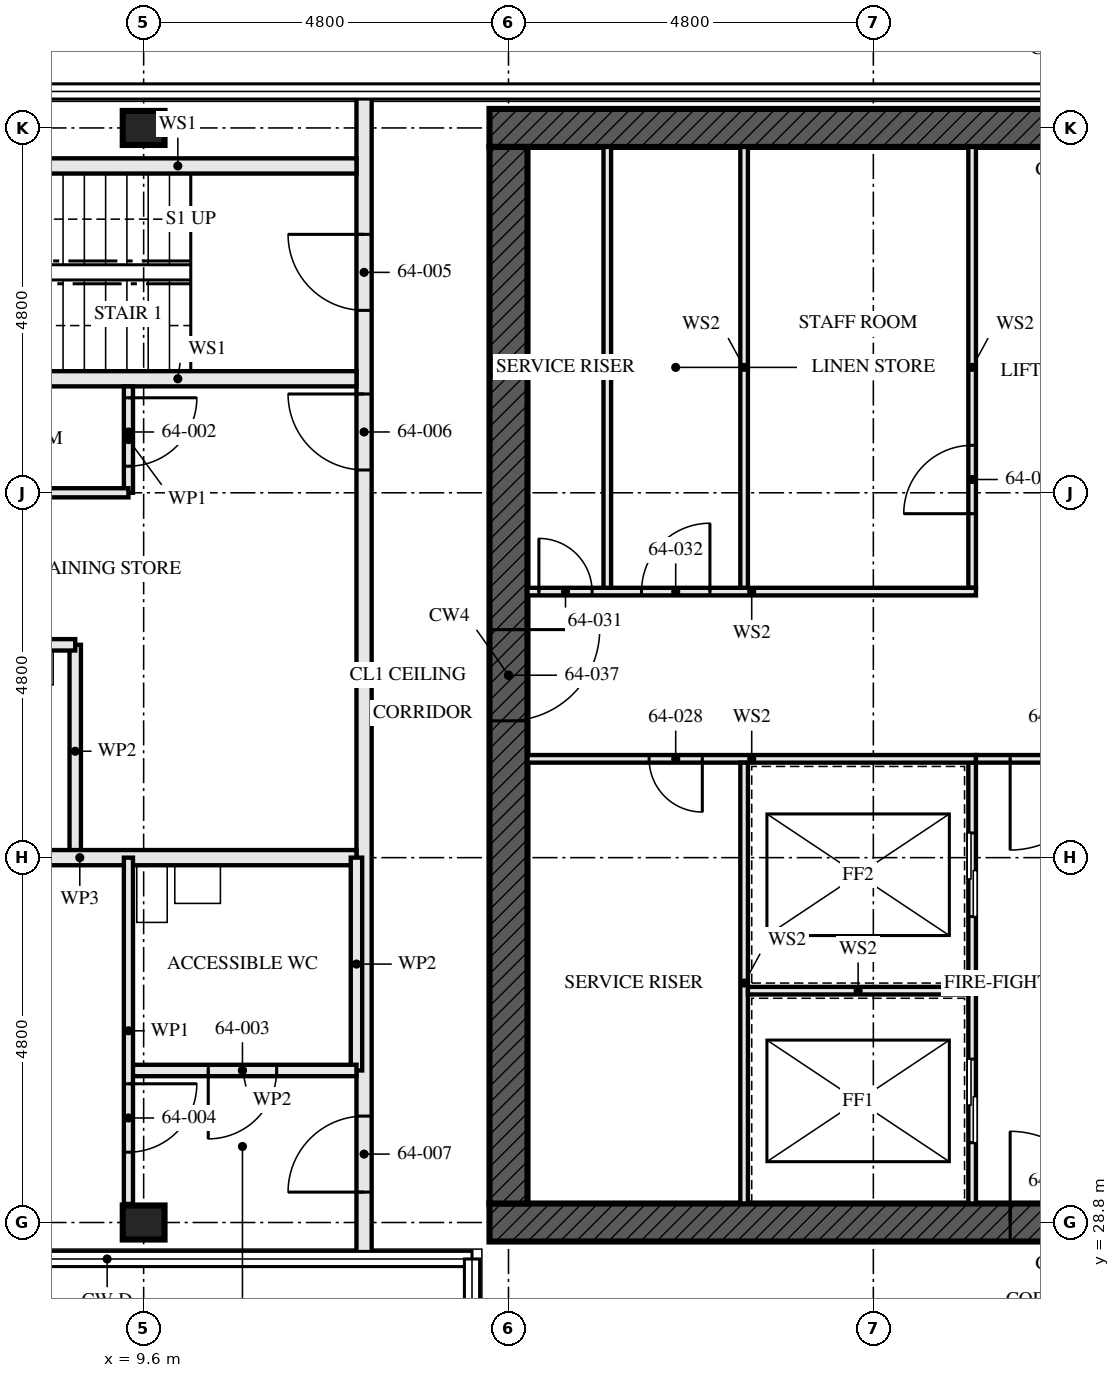
"""IFC4 building model, lengths in metres.
Left out: names, types, materials, properties, quantities, classifications, styles, units other than length and angle.
Written with IfcOpenShell. Run it as: python <this file> out.ifc"""

import sys

from ifc_helpers import new_model, si_unit, direction, frame, frame_2d, origin, origin_2d, place, context, subcontext, project, spatial, rectangle, i_section, extrude, element, fill, save


model = new_model("IFC4")
c1 = context("Model", 3, precision=1e-05, world=origin(), true_north=direction((0.0, 1.0)))
c2 = subcontext(c1, "Body", "Model", "MODEL_VIEW")
j1 = project(units=[si_unit("LENGTHUNIT", "METRE"), si_unit("PLANEANGLEUNIT", "RADIAN")], contexts=[c1])
p1 = place(None, origin())
s1 = spatial("IfcSite", under=j1, at=p1, CompositionType="ELEMENT")
p2 = place(p1, origin())
s2 = spatial("IfcBuilding", under=s1, at=p2, CompositionType="ELEMENT")
p3 = place(p2, frame((0.0, 0.0, 233.0)))
s3 = spatial("IfcBuildingStorey", under=s2, at=p3, CompositionType="ELEMENT", Elevation=233.0)
for number, where, z_axis, x_axis in (
    (1, (9.6, 28.8, 0.0), (0.0, 0.0, 1.0), (0.0, 1.0, 0.0)),
    (2, (9.6, 43.2, 0.0), (0.0, 0.0, 1.0), (0.0, 1.0, 0.0)),
):
    element("IfcColumn", number, at=place(p3, frame(where, z_axis=z_axis, x_axis=x_axis)), inside=s3, PredefinedType="COLUMN", context=c2, shape_type="SweptSolid", body=[
        extrude(i_section(OverallWidth=0.448, OverallDepth=0.55, WebThickness=0.072, FlangeThickness=0.115, FilletRadius=0.015, at=origin_2d()), origin(), (0.0, 0.0, 1.0), 3.5),
    ])
p4 = place(p3, frame((14.15, 28.8, -0.17), z_axis=(0.0, 0.0, 1.0), x_axis=(1.0, 0.0, 0.0)))
e3 = element("IfcWall", 3, at=p4, inside=s3, PredefinedType="SHEAR", context=c2, shape_type="SweptSolid", body=[
    extrude(rectangle(XDim=14.9, YDim=0.5, at=frame_2d((7.45, 0.0))), origin(), (0.0, 0.0, 1.0), 3.5),
])
p5 = place(p4, frame((6.85, 0.0, 0.17)))
e4 = element("IfcOpeningElement", 4, at=p5, cuts=e3, PredefinedType="OPENING", context=c2, shape_type="SweptSolid", body=[
    extrude(rectangle(XDim=1.2, YDim=2.1, at=frame_2d((0.6, 1.05))), frame((0.0, 0.26, 0.0), z_axis=(0.0, -1.0, 0.0), x_axis=(1.0, 0.0, 0.0)), (0.0, 0.0, 1.0), 0.521),
])
p6 = place(p3, frame((29.05, 43.2, -0.17), z_axis=(0.0, 0.0, 1.0), x_axis=(-1.0, 0.0, 0.0)))
e5 = element("IfcWall", 5, at=p6, inside=s3, PredefinedType="SHEAR", context=c2, shape_type="SweptSolid", body=[
    extrude(rectangle(XDim=14.9, YDim=0.5, at=frame_2d((7.45, 0.0))), origin(), (0.0, 0.0, 1.0), 3.5),
])
p7 = place(p3, frame((14.4, 42.95, -0.17), z_axis=(0.0, 0.0, 1.0), x_axis=(0.0, -1.0, 0.0)))
e6 = element("IfcWall", 6, at=p7, inside=s3, PredefinedType="SHEAR", context=c2, shape_type="SweptSolid", body=[
    extrude(rectangle(XDim=13.9, YDim=0.5, at=frame_2d((6.95, 0.0))), origin(), (0.0, 0.0, 1.0), 3.5),
])
p8 = place(p7, frame((6.35, 0.0, 0.17)))
e7 = element("IfcOpeningElement", 7, at=p8, cuts=e6, PredefinedType="OPENING", context=c2, shape_type="SweptSolid", body=[
    extrude(rectangle(XDim=1.2, YDim=2.1, at=frame_2d((0.6, 1.05))), frame((0.0, 0.26, 0.0), z_axis=(0.0, -1.0, 0.0), x_axis=(1.0, 0.0, 0.0)), (0.0, 0.0, 1.0), 0.521),
])
for number, where, z_axis, x_axis in (
    (8, (7.7, 42.7, 0.0), (0.0, 0.0, 1.0), (1.0, 0.0, 0.0)),
    (9, (7.7, 39.9, 0.0), (0.0, 0.0, 1.0), (1.0, 0.0, 0.0)),
):
    element("IfcWall", number, at=place(p3, frame(where, z_axis=z_axis, x_axis=x_axis)), inside=s3, PredefinedType="SOLIDWALL", context=c2, shape_type="SweptSolid", body=[
        extrude(rectangle(XDim=4.7, YDim=0.2, at=frame_2d((2.35, 0.0))), origin(), (0.0, 0.0, 1.0), 2.99),
    ])
p9 = place(p3, frame((5.7, 36.4, 0.0), z_axis=(0.0, 0.0, 1.0), x_axis=(1.0, 0.0, 0.0)))
e10 = element("IfcWall", 10, at=p9, inside=s3, PredefinedType="PARTITIONING", context=c2, shape_type="SweptSolid", body=[
    extrude(rectangle(XDim=3.0, YDim=0.15, at=frame_2d((1.5, 0.0))), origin(), (0.0, 0.0, 1.0), 3.33),
])
p10 = place(p9, frame((1.05, 0.0, 0.0)))
e11 = element("IfcOpeningElement", 11, at=p10, cuts=e10, PredefinedType="OPENING", context=c2, shape_type="SweptSolid", body=[
    extrude(rectangle(XDim=0.9, YDim=2.1, at=frame_2d((0.45, 1.05))), frame((0.0, 0.085, 0.0), z_axis=(0.0, -1.0, 0.0), x_axis=(1.0, 0.0, 0.0)), (0.0, 0.0, 1.0), 0.171),
])
p11 = place(p3, frame((8.7, 36.4, 0.0), z_axis=(0.0, 0.0, 1.0), x_axis=(0.0, -1.0, 0.0)))
e12 = element("IfcWall", 12, at=p11, inside=s3, PredefinedType="PARTITIONING", context=c2, shape_type="SweptSolid", body=[
    extrude(rectangle(XDim=2.8, YDim=0.15, at=frame_2d((1.4, 0.0))), origin(), (0.0, 0.0, 1.0), 3.33),
])
p12 = place(p3, frame((9.4, 39.8, 0.0), z_axis=(0.0, 0.0, 1.0), x_axis=(0.0, -1.0, 0.0)))
e13 = element("IfcWall", 13, at=p12, inside=s3, PredefinedType="PARTITIONING", context=c2, shape_type="SweptSolid", body=[
    extrude(rectangle(XDim=1.4, YDim=0.12, at=frame_2d((0.7, 0.0))), origin(), (0.0, 0.0, 1.0), 3.33),
])
p13 = place(p12, frame((0.15, 0.0, 0.0)))
e14 = element("IfcOpeningElement", 14, at=p13, cuts=e13, PredefinedType="OPENING", context=c2, shape_type="SweptSolid", body=[
    extrude(rectangle(XDim=0.9, YDim=2.1, at=frame_2d((0.45, 1.05))), frame((0.0, 0.071, 0.0), z_axis=(0.0, -1.0, 0.0), x_axis=(1.0, 0.0, 0.0)), (0.0, 0.0, 1.0), 0.141),
])
p14 = place(p3, frame((5.7, 38.4, 0.0), z_axis=(0.0, 0.0, 1.0), x_axis=(1.0, 0.0, 0.0)))
e15 = element("IfcWall", 15, at=p14, inside=s3, PredefinedType="PARTITIONING", context=c2, shape_type="SweptSolid", body=[
    extrude(rectangle(XDim=3.7, YDim=0.12, at=frame_2d((1.85, 0.0))), origin(), (0.0, 0.0, 1.0), 2.55),
])
p15 = place(p3, frame((5.12, 33.6, 0.0), z_axis=(0.0, 0.0, 1.0), x_axis=(1.0, 0.0, 0.0)))
e16 = element("IfcWall", 16, at=p15, inside=s3, PredefinedType="PARTITIONING", context=c2, shape_type="SweptSolid", body=[
    extrude(rectangle(XDim=7.28, YDim=0.2, at=frame_2d((3.64, 0.0))), origin(), (0.0, 0.0, 1.0), 2.55),
])
p16 = place(p3, frame((9.4, 30.8, 0.0), z_axis=(0.0, 0.0, 1.0), x_axis=(1.0, 0.0, 0.0)))
e17 = element("IfcWall", 17, at=p16, inside=s3, PredefinedType="PARTITIONING", context=c2, shape_type="SweptSolid", body=[
    extrude(rectangle(XDim=3.0, YDim=0.15, at=frame_2d((1.5, 0.0))), origin(), (0.0, 0.0, 1.0), 3.33),
])
p17 = place(p16, frame((1.05, 0.0, 0.0)))
e18 = element("IfcOpeningElement", 18, at=p17, cuts=e17, PredefinedType="OPENING", context=c2, shape_type="SweptSolid", body=[
    extrude(rectangle(XDim=0.9, YDim=2.1, at=frame_2d((0.45, 1.05))), frame((0.0, 0.085, 0.0), z_axis=(0.0, -1.0, 0.0), x_axis=(1.0, 0.0, 0.0)), (0.0, 0.0, 1.0), 0.171),
])
p18 = place(p3, frame((12.4, 33.6, 0.0), z_axis=(0.0, 0.0, 1.0), x_axis=(0.0, -1.0, 0.0)))
e19 = element("IfcWall", 19, at=p18, inside=s3, PredefinedType="PARTITIONING", context=c2, shape_type="SweptSolid", body=[
    extrude(rectangle(XDim=2.8, YDim=0.15, at=frame_2d((1.4, 0.0))), origin(), (0.0, 0.0, 1.0), 3.33),
])
p19 = place(p3, frame((9.4, 33.6, 0.0), z_axis=(0.0, 0.0, 1.0), x_axis=(0.0, -1.0, 0.0)))
e20 = element("IfcWall", 20, at=p19, inside=s3, PredefinedType="PARTITIONING", context=c2, shape_type="SweptSolid", body=[
    extrude(rectangle(XDim=4.556, YDim=0.12, at=frame_2d((2.278, 0.0))), origin(), (0.0, 0.0, 1.0), 3.33),
])
p20 = place(p19, frame((2.975, 0.0, 0.0)))
e21 = element("IfcOpeningElement", 21, at=p20, cuts=e20, PredefinedType="OPENING", context=c2, shape_type="SweptSolid", body=[
    extrude(rectangle(XDim=0.9, YDim=2.1, at=frame_2d((0.45, 1.05))), frame((0.0, 0.071, 0.0), z_axis=(0.0, -1.0, 0.0), x_axis=(1.0, 0.0, 0.0)), (0.0, 0.0, 1.0), 0.141),
])
p21 = place(p3, frame((12.5, 43.655, 0.0), z_axis=(0.0, 0.0, 1.0), x_axis=(0.0, -1.0, 0.0)))
e22 = element("IfcWall", 22, at=p21, inside=s3, PredefinedType="PARTITIONING", context=c2, shape_type="SweptSolid", body=[
    extrude(rectangle(XDim=15.31, YDim=0.2, at=frame_2d((7.655, 0.0))), origin(), (0.0, 0.0, 1.0), 2.32),
])
p22 = place(p21, frame((1.855, 0.0, 0.0)))
e23 = element("IfcOpeningElement", 23, at=p22, cuts=e22, PredefinedType="OPENING", context=c2, shape_type="SweptSolid", body=[
    extrude(rectangle(XDim=1.0, YDim=2.1, at=frame_2d((0.5, 1.05))), frame((0.0, 0.111, 0.0), z_axis=(0.0, -1.0, 0.0), x_axis=(1.0, 0.0, 0.0)), (0.0, 0.0, 1.0), 0.221),
])
p23 = place(p21, frame((3.955, 0.0, 0.0)))
e24 = element("IfcOpeningElement", 24, at=p23, cuts=e22, PredefinedType="OPENING", context=c2, shape_type="SweptSolid", body=[
    extrude(rectangle(XDim=1.0, YDim=2.1, at=frame_2d((0.5, 1.05))), frame((0.0, 0.111, 0.0), z_axis=(0.0, -1.0, 0.0), x_axis=(1.0, 0.0, 0.0)), (0.0, 0.0, 1.0), 0.221),
])
p24 = place(p21, frame((13.455, 0.0, 0.0)))
e25 = element("IfcOpeningElement", 25, at=p24, cuts=e22, PredefinedType="OPENING", context=c2, shape_type="SweptSolid", body=[
    extrude(rectangle(XDim=1.0, YDim=2.1, at=frame_2d((0.5, 1.05))), frame((0.0, 0.111, 0.0), z_axis=(0.0, -1.0, 0.0), x_axis=(1.0, 0.0, 0.0)), (0.0, 0.0, 1.0), 0.221),
])
p25 = place(p3, frame((15.7, 37.15, 0.0), z_axis=(0.0, 0.0, 1.0), x_axis=(0.0, 1.0, 0.0)))
e26 = element("IfcWall", 26, at=p25, inside=s3, PredefinedType="SOLIDWALL", context=c2, shape_type="SweptSolid", body=[
    extrude(rectangle(XDim=5.8, YDim=0.1, at=frame_2d((2.9, 0.0))), origin(), (0.0, 0.0, 1.0), 3.33),
])
p26 = place(p3, frame((20.5, 29.05, 0.0), z_axis=(0.0, 0.0, 1.0), x_axis=(0.0, 1.0, 0.0)))
e27 = element("IfcWall", 27, at=p26, inside=s3, PredefinedType="SOLIDWALL", context=c2, shape_type="SweptSolid", body=[
    extrude(rectangle(XDim=5.8, YDim=0.1, at=frame_2d((2.9, 0.0))), origin(), (0.0, 0.0, 1.0), 3.33),
])
p27 = place(p26, frame((0.8, 0.0, 0.0)))
e28 = element("IfcOpeningElement", 28, at=p27, cuts=e27, PredefinedType="OPENING", context=c2, shape_type="SweptSolid", body=[
    extrude(rectangle(XDim=1.1, YDim=2.3, at=frame_2d((0.55, 1.15))), frame((0.0, 0.061, 0.0), z_axis=(0.0, -1.0, 0.0), x_axis=(1.0, 0.0, 0.0)), (0.0, 0.0, 1.0), 0.121),
])
p28 = place(p26, frame((3.775, 0.0, 0.0)))
e29 = element("IfcOpeningElement", 29, at=p28, cuts=e27, PredefinedType="OPENING", context=c2, shape_type="SweptSolid", body=[
    extrude(rectangle(XDim=1.1, YDim=2.3, at=frame_2d((0.55, 1.15))), frame((0.0, 0.061, 0.0), z_axis=(0.0, -1.0, 0.0), x_axis=(1.0, 0.0, 0.0)), (0.0, 0.0, 1.0), 0.121),
])
p29 = place(p3, frame((20.5, 37.15, 0.0), z_axis=(0.0, 0.0, 1.0), x_axis=(0.0, 1.0, 0.0)))
e30 = element("IfcWall", 30, at=p29, inside=s3, PredefinedType="SOLIDWALL", context=c2, shape_type="SweptSolid", body=[
    extrude(rectangle(XDim=5.8, YDim=0.1, at=frame_2d((2.9, 0.0))), origin(), (0.0, 0.0, 1.0), 3.33),
])
p30 = place(p29, frame((0.975, 0.0, 0.0)))
e31 = element("IfcOpeningElement", 31, at=p30, cuts=e30, PredefinedType="OPENING", context=c2, shape_type="SweptSolid", body=[
    extrude(rectangle(XDim=0.9, YDim=2.1, at=frame_2d((0.45, 1.05))), frame((0.0, 0.061, 0.0), z_axis=(0.0, -1.0, 0.0), x_axis=(1.0, 0.0, 0.0)), (0.0, 0.0, 1.0), 0.121),
])
p31 = place(p3, frame((14.65, 34.9, 0.0), z_axis=(0.0, 0.0, 1.0), x_axis=(1.0, 0.0, 0.0)))
e32 = element("IfcWall", 32, at=p31, inside=s3, PredefinedType="SOLIDWALL", context=c2, shape_type="SweptSolid", body=[
    extrude(rectangle(XDim=5.9, YDim=0.1, at=frame_2d((2.95, 0.0))), origin(), (0.0, 0.0, 1.0), 3.33),
])
p32 = place(p31, frame((1.6, 0.0, 0.0)))
e33 = element("IfcOpeningElement", 33, at=p32, cuts=e32, PredefinedType="OPENING", context=c2, shape_type="SweptSolid", body=[
    extrude(rectangle(XDim=0.7, YDim=2.1, at=frame_2d((0.35, 1.05))), frame((0.0, 0.061, 0.0), z_axis=(0.0, -1.0, 0.0), x_axis=(1.0, 0.0, 0.0)), (0.0, 0.0, 1.0), 0.121),
])
p33 = place(p3, frame((14.65, 37.1, 0.0), z_axis=(0.0, 0.0, 1.0), x_axis=(1.0, 0.0, 0.0)))
e34 = element("IfcWall", 34, at=p33, inside=s3, PredefinedType="SOLIDWALL", context=c2, shape_type="SweptSolid", body=[
    extrude(rectangle(XDim=5.9, YDim=0.1, at=frame_2d((2.95, 0.0))), origin(), (0.0, 0.0, 1.0), 3.33),
])
p34 = place(p33, frame((0.15, 0.0, 0.0)))
e35 = element("IfcOpeningElement", 35, at=p34, cuts=e34, PredefinedType="OPENING", context=c2, shape_type="SweptSolid", body=[
    extrude(rectangle(XDim=0.7, YDim=2.1, at=frame_2d((0.35, 1.05))), frame((0.0, 0.061, 0.0), z_axis=(0.0, -1.0, 0.0), x_axis=(1.0, 0.0, 0.0)), (0.0, 0.0, 1.0), 0.121),
])
p35 = place(p33, frame((1.5, 0.0, 0.0)))
e36 = element("IfcOpeningElement", 36, at=p35, cuts=e34, PredefinedType="OPENING", context=c2, shape_type="SweptSolid", body=[
    extrude(rectangle(XDim=0.9, YDim=2.1, at=frame_2d((0.45, 1.05))), frame((0.0, 0.061, 0.0), z_axis=(0.0, -1.0, 0.0), x_axis=(1.0, 0.0, 0.0)), (0.0, 0.0, 1.0), 0.121),
])
p36 = place(p3, frame((20.55, 34.9, 0.0), z_axis=(0.0, 0.0, 1.0), x_axis=(1.0, 0.0, 0.0)))
e37 = element("IfcWall", 37, at=p36, inside=s3, PredefinedType="SOLIDWALL", context=c2, shape_type="SweptSolid", body=[
    extrude(rectangle(XDim=2.5, YDim=0.1, at=frame_2d((1.25, 0.0))), origin(), (0.0, 0.0, 1.0), 3.33),
])
p37 = place(p36, frame((0.45, 0.0, 0.0)))
e38 = element("IfcOpeningElement", 38, at=p37, cuts=e37, PredefinedType="OPENING", context=c2, shape_type="SweptSolid", body=[
    extrude(rectangle(XDim=1.2, YDim=2.1, at=frame_2d((0.6, 1.05))), frame((0.0, 0.061, 0.0), z_axis=(0.0, -1.0, 0.0), x_axis=(1.0, 0.0, 0.0)), (0.0, 0.0, 1.0), 0.121),
])
p38 = place(p3, frame((17.5, 29.05, 0.0), z_axis=(0.0, 0.0, 1.0), x_axis=(0.0, 1.0, 0.0)))
e39 = element("IfcWall", 39, at=p38, inside=s3, PredefinedType="SOLIDWALL", context=c2, shape_type="SweptSolid", body=[
    extrude(rectangle(XDim=5.8, YDim=0.1, at=frame_2d((2.9, 0.0))), origin(), (0.0, 0.0, 1.0), 3.33),
])
p39 = place(p3, frame((17.55, 31.85, 0.0), z_axis=(0.0, 0.0, 1.0), x_axis=(1.0, 0.0, 0.0)))
e40 = element("IfcWall", 40, at=p39, inside=s3, PredefinedType="SOLIDWALL", context=c2, shape_type="SweptSolid", body=[
    extrude(rectangle(XDim=2.9, YDim=0.1, at=frame_2d((1.45, 0.0))), origin(), (0.0, 0.0, 1.0), 3.33),
])
p40 = place(p3, frame((17.5, 37.15, 0.0), z_axis=(0.0, 0.0, 1.0), x_axis=(0.0, 1.0, 0.0)))
e41 = element("IfcWall", 41, at=p40, inside=s3, PredefinedType="SOLIDWALL", context=c2, shape_type="SweptSolid", body=[
    extrude(rectangle(XDim=5.8, YDim=0.1, at=frame_2d((2.9, 0.0))), origin(), (0.0, 0.0, 1.0), 3.33),
])
p41 = place(p13, origin())
e42 = element("IfcDoor", 42, at=p41, inside=s3, OperationType="SINGLE_SWING_RIGHT", PredefinedType="DOOR", context=c2, shape_type="SweptSolid", body=[
    extrude(rectangle(XDim=0.9, YDim=2.1, at=frame_2d((0.45, 1.05))), frame((0.0, 0.022, 0.0), z_axis=(0.0, -1.0, 0.0), x_axis=(1.0, 0.0, 0.0)), (0.0, 0.0, 1.0), 0.044),
])
fill(e14, e42)
p42 = place(p17, frame((0.9, 0.0, 0.0), z_axis=(0.0, 0.0, 1.0), x_axis=(-1.0, 0.0, 0.0)))
e43 = element("IfcDoor", 43, at=p42, inside=s3, OperationType="SINGLE_SWING_LEFT", PredefinedType="DOOR", context=c2, shape_type="SweptSolid", body=[
    extrude(rectangle(XDim=0.9, YDim=2.1, at=frame_2d((0.45, 1.05))), frame((0.0, 0.022, 0.0), z_axis=(0.0, -1.0, 0.0), x_axis=(1.0, 0.0, 0.0)), (0.0, 0.0, 1.0), 0.044),
])
fill(e18, e43)
p43 = place(p20, origin())
e44 = element("IfcDoor", 44, at=p43, inside=s3, OperationType="SINGLE_SWING_RIGHT", PredefinedType="DOOR", context=c2, shape_type="SweptSolid", body=[
    extrude(rectangle(XDim=0.9, YDim=2.1, at=frame_2d((0.45, 1.05))), frame((0.0, 0.022, 0.0), z_axis=(0.0, -1.0, 0.0), x_axis=(1.0, 0.0, 0.0)), (0.0, 0.0, 1.0), 0.044),
])
fill(e21, e44)
p44 = place(p22, frame((1.0, 0.0, 0.0), z_axis=(0.0, 0.0, 1.0), x_axis=(-1.0, 0.0, 0.0)))
e45 = element("IfcDoor", 45, at=p44, inside=s3, OperationType="SINGLE_SWING_LEFT", PredefinedType="DOOR", context=c2, shape_type="SweptSolid", body=[
    extrude(rectangle(XDim=1.0, YDim=2.1, at=frame_2d((0.5, 1.05))), frame((0.0, 0.032, 0.0), z_axis=(0.0, -1.0, 0.0), x_axis=(1.0, 0.0, 0.0)), (0.0, 0.0, 1.0), 0.064),
])
fill(e23, e45)
p45 = place(p23, frame((1.0, 0.0, 0.0), z_axis=(0.0, 0.0, 1.0), x_axis=(-1.0, 0.0, 0.0)))
e46 = element("IfcDoor", 46, at=p45, inside=s3, OperationType="SINGLE_SWING_LEFT", PredefinedType="DOOR", context=c2, shape_type="SweptSolid", body=[
    extrude(rectangle(XDim=1.0, YDim=2.1, at=frame_2d((0.5, 1.05))), frame((0.0, 0.027, 0.0), z_axis=(0.0, -1.0, 0.0), x_axis=(1.0, 0.0, 0.0)), (0.0, 0.0, 1.0), 0.054),
])
fill(e24, e46)
p46 = place(p24, frame((1.0, 0.0, 0.0), z_axis=(0.0, 0.0, 1.0), x_axis=(-1.0, 0.0, 0.0)))
e47 = element("IfcDoor", 47, at=p46, inside=s3, OperationType="SINGLE_SWING_RIGHT", PredefinedType="DOOR", context=c2, shape_type="SweptSolid", body=[
    extrude(rectangle(XDim=1.0, YDim=2.1, at=frame_2d((0.5, 1.05))), frame((0.0, 0.027, 0.0), z_axis=(0.0, -1.0, 0.0), x_axis=(1.0, 0.0, 0.0)), (0.0, 0.0, 1.0), 0.054),
])
fill(e25, e47)
p47 = place(p27, origin())
e48 = element("IfcDoor", 48, at=p47, inside=s3, OperationType="SLIDING_TO_LEFT", PredefinedType="DOOR", context=c2, shape_type="SweptSolid", body=[
    extrude(rectangle(XDim=1.1, YDim=2.3, at=frame_2d((0.55, 1.15))), frame((0.0, 0.05, 0.0), z_axis=(0.0, -1.0, 0.0), x_axis=(1.0, 0.0, 0.0)), (0.0, 0.0, 1.0), 0.1),
])
fill(e28, e48)
p48 = place(p28, origin())
e49 = element("IfcDoor", 49, at=p48, inside=s3, OperationType="SLIDING_TO_LEFT", PredefinedType="DOOR", context=c2, shape_type="SweptSolid", body=[
    extrude(rectangle(XDim=1.1, YDim=2.3, at=frame_2d((0.55, 1.15))), frame((0.0, 0.05, 0.0), z_axis=(0.0, -1.0, 0.0), x_axis=(1.0, 0.0, 0.0)), (0.0, 0.0, 1.0), 0.1),
])
fill(e29, e49)
p49 = place(p30, origin())
e50 = element("IfcDoor", 50, at=p49, inside=s3, OperationType="SINGLE_SWING_RIGHT", PredefinedType="DOOR", context=c2, shape_type="SweptSolid", body=[
    extrude(rectangle(XDim=0.9, YDim=2.1, at=frame_2d((0.45, 1.05))), frame((0.0, 0.027, 0.0), z_axis=(0.0, -1.0, 0.0), x_axis=(1.0, 0.0, 0.0)), (0.0, 0.0, 1.0), 0.054),
])
fill(e31, e50)
p50 = place(p32, frame((0.7, 0.0, 0.0), z_axis=(0.0, 0.0, 1.0), x_axis=(-1.0, 0.0, 0.0)))
e51 = element("IfcDoor", 51, at=p50, inside=s3, OperationType="SINGLE_SWING_RIGHT", PredefinedType="DOOR", context=c2, shape_type="SweptSolid", body=[
    extrude(rectangle(XDim=0.7, YDim=2.1, at=frame_2d((0.35, 1.05))), frame((0.0, 0.027, 0.0), z_axis=(0.0, -1.0, 0.0), x_axis=(1.0, 0.0, 0.0)), (0.0, 0.0, 1.0), 0.054),
])
fill(e33, e51)
p51 = place(p34, origin())
e52 = element("IfcDoor", 52, at=p51, inside=s3, OperationType="SINGLE_SWING_RIGHT", PredefinedType="DOOR", context=c2, shape_type="SweptSolid", body=[
    extrude(rectangle(XDim=0.7, YDim=2.1, at=frame_2d((0.35, 1.05))), frame((0.0, 0.027, 0.0), z_axis=(0.0, -1.0, 0.0), x_axis=(1.0, 0.0, 0.0)), (0.0, 0.0, 1.0), 0.054),
])
fill(e35, e52)
p52 = place(p35, origin())
e53 = element("IfcDoor", 53, at=p52, inside=s3, OperationType="SINGLE_SWING_LEFT", PredefinedType="DOOR", context=c2, shape_type="SweptSolid", body=[
    extrude(rectangle(XDim=0.9, YDim=2.1, at=frame_2d((0.45, 1.05))), frame((0.0, 0.027, 0.0), z_axis=(0.0, -1.0, 0.0), x_axis=(1.0, 0.0, 0.0)), (0.0, 0.0, 1.0), 0.054),
])
fill(e36, e53)
p53 = place(p37, frame((1.2, 0.0, 0.0), z_axis=(0.0, 0.0, 1.0), x_axis=(-1.0, 0.0, 0.0)))
e54 = element("IfcDoor", 54, at=p53, inside=s3, OperationType="SINGLE_SWING_LEFT", PredefinedType="DOOR", context=c2, shape_type="SweptSolid", body=[
    extrude(rectangle(XDim=1.2, YDim=2.1, at=frame_2d((0.6, 1.05))), frame((0.0, 0.027, 0.0), z_axis=(0.0, -1.0, 0.0), x_axis=(1.0, 0.0, 0.0)), (0.0, 0.0, 1.0), 0.054),
])
fill(e38, e54)
p54 = place(p5, origin())
e55 = element("IfcDoor", 55, at=p54, inside=s3, OperationType="SINGLE_SWING_LEFT", PredefinedType="DOOR", context=c2, shape_type="SweptSolid", body=[
    extrude(rectangle(XDim=1.2, YDim=2.1, at=frame_2d((0.6, 1.05))), frame((0.0, 0.027, 0.0), z_axis=(0.0, -1.0, 0.0), x_axis=(1.0, 0.0, 0.0)), (0.0, 0.0, 1.0), 0.054),
])
fill(e4, e55)
p55 = place(p8, origin())
e56 = element("IfcDoor", 56, at=p55, inside=s3, OperationType="SINGLE_SWING_LEFT", PredefinedType="DOOR", context=c2, shape_type="SweptSolid", body=[
    extrude(rectangle(XDim=1.2, YDim=2.1, at=frame_2d((0.6, 1.05))), frame((0.0, 0.027, 0.0), z_axis=(0.0, -1.0, 0.0), x_axis=(1.0, 0.0, 0.0)), (0.0, 0.0, 1.0), 0.054),
])
fill(e7, e56)
save(model, sys.argv[1])
